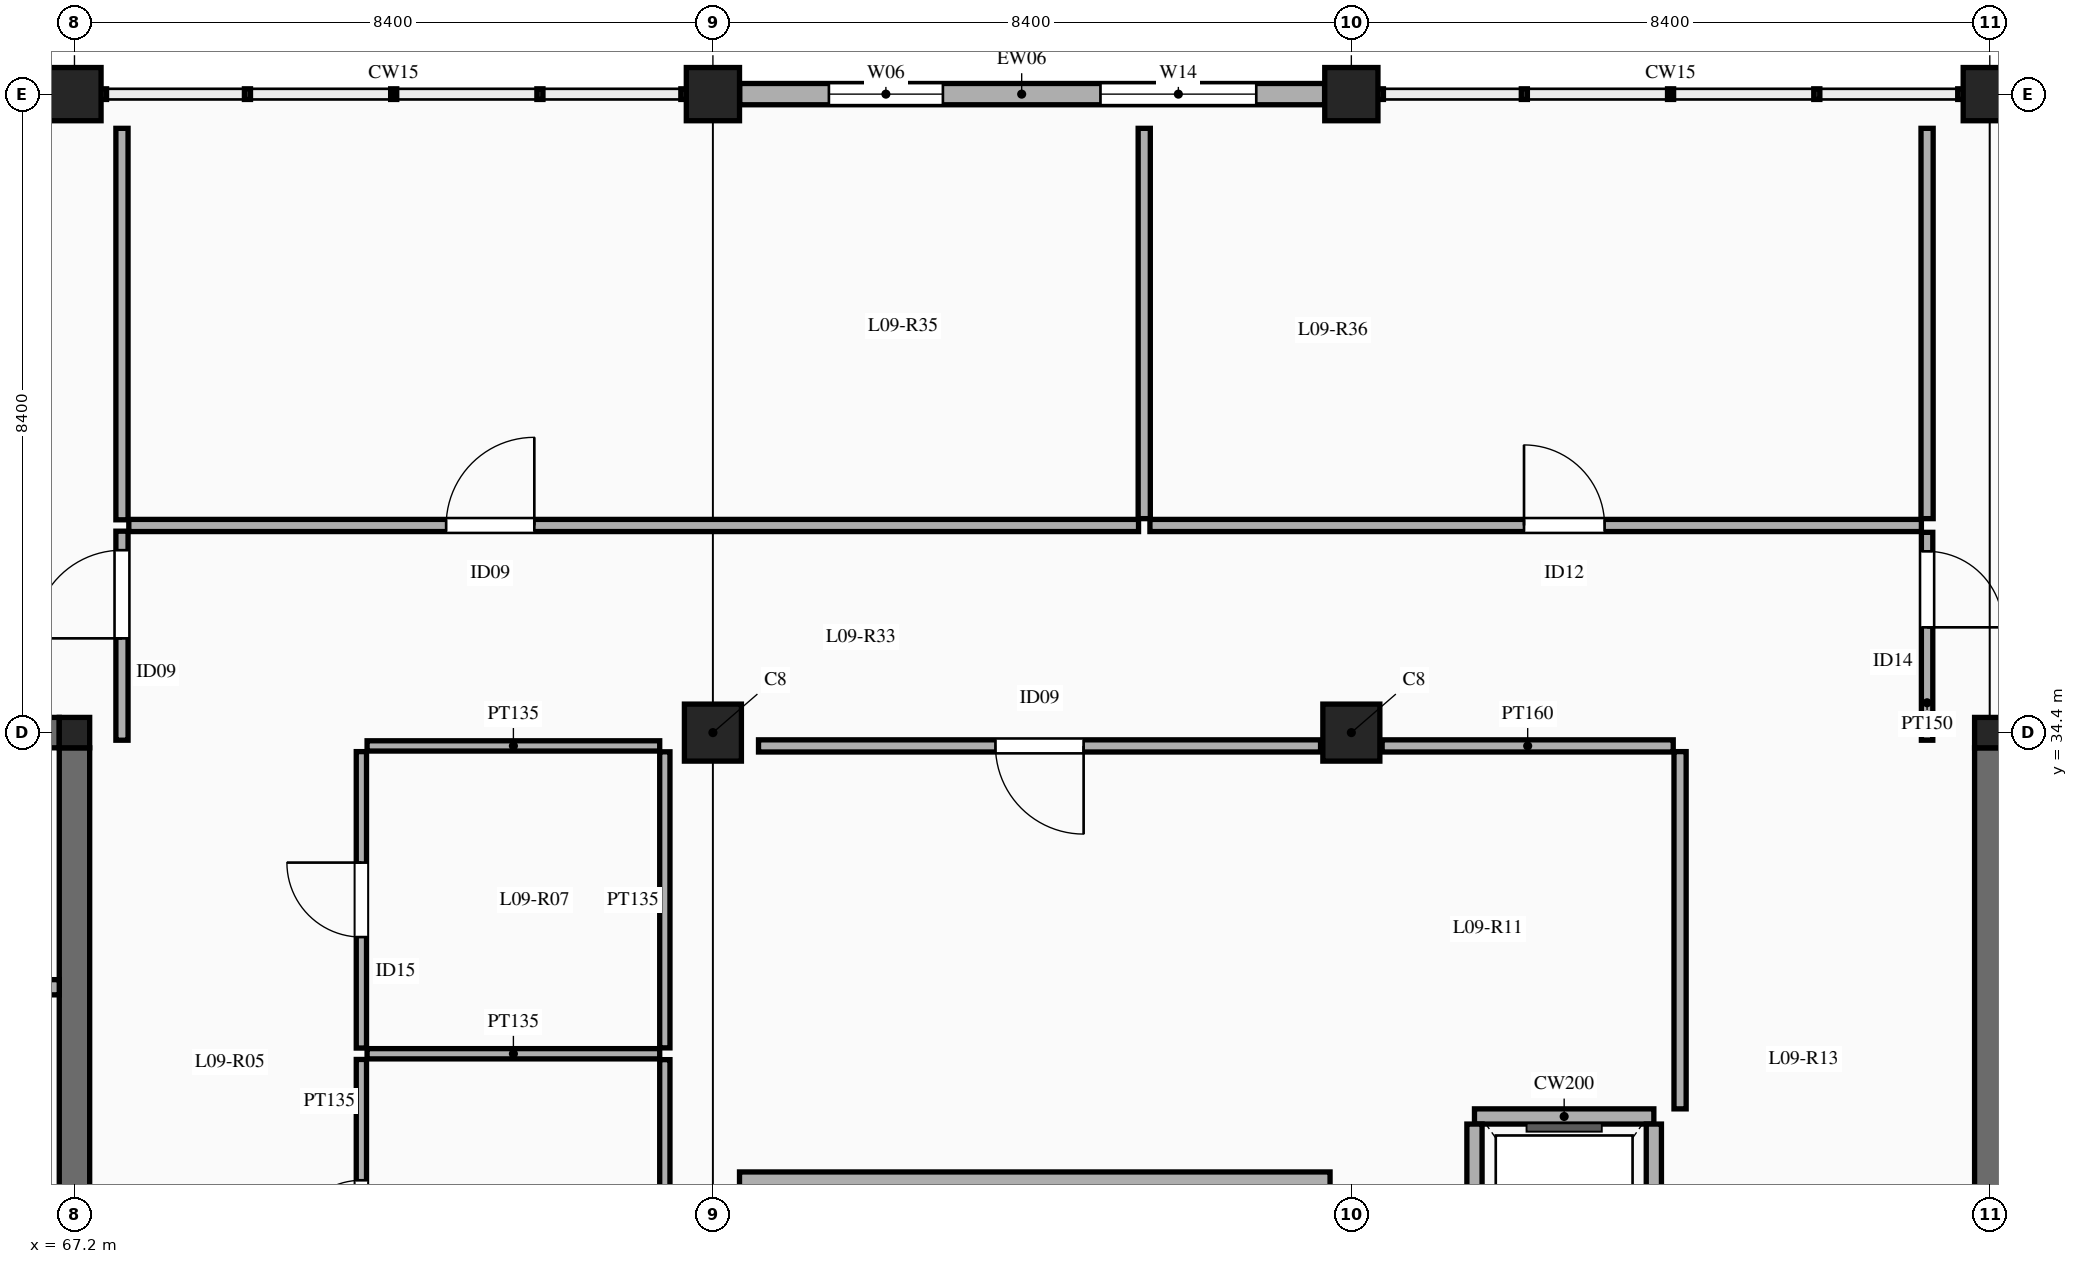
"""IFC4 building model, lengths in metres.
Left out: names, types, materials, properties, quantities, classifications, styles, units other than length and angle.
Written with IfcOpenShell. Run it as: python <this file> out.ifc"""

import sys

from ifc_helpers import new_model, si_unit, direction, frame, frame_2d, origin, origin_2d, place, context, subcontext, project, spatial, rectangle, extrude, element, fill, save


model = new_model("IFC4")
c1 = context("Model", 3, precision=1e-05, world=origin(), true_north=direction((0.0, 1.0)))
c2 = subcontext(c1, "Body", "Model", "MODEL_VIEW")
j1 = project(units=[si_unit("LENGTHUNIT", "METRE"), si_unit("PLANEANGLEUNIT", "RADIAN")], contexts=[c1])
p1 = place(None, origin())
s1 = spatial("IfcSite", under=j1, at=p1, CompositionType="ELEMENT")
p2 = place(p1, origin())
s2 = spatial("IfcBuilding", under=s1, at=p2, CompositionType="ELEMENT")
p3 = place(p2, frame((0.0, 0.0, 42.0)))
s3 = spatial("IfcBuildingStorey", under=s2, at=p3, CompositionType="ELEMENT", Elevation=42.0)
p4 = place(p3, frame((67.2, 34.4, 0.0), z_axis=(0.0, 0.0, 1.0), x_axis=(1.0, 0.0, 0.0)))
e1 = element("IfcColumn", 1, at=p4, inside=s3, PredefinedType="COLUMN", context=c2, shape_type="SweptSolid", body=[
    extrude(rectangle(XDim=0.4, YDim=0.4, at=origin_2d()), origin(), (0.0, 0.0, 1.0), 4.5),
])
p5 = place(p3, frame((67.2, 42.8, 0.0), z_axis=(0.0, 0.0, 1.0), x_axis=(1.0, 0.0, 0.0)))
e2 = element("IfcColumn", 2, at=p5, inside=s3, PredefinedType="COLUMN", context=c2, shape_type="SweptSolid", body=[
    extrude(rectangle(XDim=0.7, YDim=0.7, at=origin_2d()), origin(), (0.0, 0.0, 1.0), 4.5),
])
p6 = place(p3, frame((75.6, 34.4, 0.0), z_axis=(0.0, 0.0, 1.0), x_axis=(1.0, 0.0, 0.0)))
e3 = element("IfcColumn", 3, at=p6, inside=s3, PredefinedType="COLUMN", context=c2, shape_type="SweptSolid", body=[
    extrude(rectangle(XDim=0.75, YDim=0.75, at=origin_2d()), origin(), (0.0, 0.0, 1.0), 4.5),
])
p7 = place(p3, frame((75.6, 42.8, 0.0), z_axis=(0.0, 0.0, 1.0), x_axis=(1.0, 0.0, 0.0)))
e4 = element("IfcColumn", 4, at=p7, inside=s3, PredefinedType="COLUMN", context=c2, shape_type="SweptSolid", body=[
    extrude(rectangle(XDim=0.7, YDim=0.7, at=origin_2d()), origin(), (0.0, 0.0, 1.0), 4.5),
])
p8 = place(p3, frame((84.0, 34.4, 0.0), z_axis=(0.0, 0.0, 1.0), x_axis=(1.0, 0.0, 0.0)))
e5 = element("IfcColumn", 5, at=p8, inside=s3, PredefinedType="COLUMN", context=c2, shape_type="SweptSolid", body=[
    extrude(rectangle(XDim=0.75, YDim=0.75, at=origin_2d()), origin(), (0.0, 0.0, 1.0), 4.5),
])
p9 = place(p3, frame((84.0, 42.8, 0.0), z_axis=(0.0, 0.0, 1.0), x_axis=(1.0, 0.0, 0.0)))
e6 = element("IfcColumn", 6, at=p9, inside=s3, PredefinedType="COLUMN", context=c2, shape_type="SweptSolid", body=[
    extrude(rectangle(XDim=0.7, YDim=0.7, at=origin_2d()), origin(), (0.0, 0.0, 1.0), 4.5),
])
p10 = place(p3, frame((92.4, 34.4, 0.0), z_axis=(0.0, 0.0, 1.0), x_axis=(1.0, 0.0, 0.0)))
e7 = element("IfcColumn", 7, at=p10, inside=s3, PredefinedType="COLUMN", context=c2, shape_type="SweptSolid", body=[
    extrude(rectangle(XDim=0.4, YDim=0.4, at=origin_2d()), origin(), (0.0, 0.0, 1.0), 4.5),
])
p11 = place(p3, frame((92.4, 42.8, 0.0), z_axis=(0.0, 0.0, 1.0), x_axis=(1.0, 0.0, 0.0)))
e8 = element("IfcColumn", 8, at=p11, inside=s3, PredefinedType="COLUMN", context=c2, shape_type="SweptSolid", body=[
    extrude(rectangle(XDim=0.7, YDim=0.7, at=origin_2d()), origin(), (0.0, 0.0, 1.0), 4.5),
])
for number, where, z_axis, x_axis in (
    (9, (67.2, 26.2, 0.0), (0.0, 0.0, 1.0), (0.0, 1.0, 0.0)),
    (10, (59.0, 34.4, 0.0), (0.0, 0.0, 1.0), (1.0, 0.0, 0.0)),
    (11, (92.4, 26.2, 0.0), (0.0, 0.0, 1.0), (0.0, 1.0, 0.0)),
):
    element("IfcWall", number, at=place(p3, frame(where, z_axis=z_axis, x_axis=x_axis)), inside=s3, PredefinedType="SHEAR", context=c2, shape_type="SweptSolid", body=[
        extrude(rectangle(XDim=8.0, YDim=0.4, at=frame_2d((4.0, 0.0))), origin(), (0.0, 0.0, 1.0), 4.5),
    ])
p12 = place(p3, frame((75.952, 42.8, 0.0), z_axis=(0.0, 0.0, 1.0), x_axis=(1.0, 0.0, 0.0)))
e12 = element("IfcWall", 12, at=p12, inside=s3, PredefinedType="ELEMENTEDWALL", context=c2, shape_type="SweptSolid", body=[
    extrude(rectangle(XDim=7.696, YDim=0.28, at=frame_2d((3.848, 0.0))), origin(), (0.0, 0.0, 1.0), 3.55),
])
p13 = place(p12, frame((1.174, 0.0, 0.9)))
e13 = element("IfcOpeningElement", 13, at=p13, cuts=e12, PredefinedType="OPENING", context=c2, shape_type="SweptSolid", body=[
    extrude(rectangle(XDim=1.5, YDim=2.0, at=frame_2d((0.75, 1.0))), frame((0.0, 0.15, 0.0), z_axis=(0.0, -1.0, 0.0), x_axis=(1.0, 0.0, 0.0)), (0.0, 0.0, 1.0), 0.3),
])
p14 = place(p12, frame((4.747, 0.0, 0.9)))
e14 = element("IfcOpeningElement", 14, at=p14, cuts=e12, PredefinedType="OPENING", context=c2, shape_type="SweptSolid", body=[
    extrude(rectangle(XDim=2.05, YDim=2.1, at=frame_2d((1.025, 1.05))), frame((0.0, 0.15, 0.0), z_axis=(0.0, -1.0, 0.0), x_axis=(1.0, 0.0, 0.0)), (0.0, 0.0, 1.0), 0.3),
])
p15 = place(p3, frame((63.05, 31.05, 0.0), z_axis=(0.0, 0.0, 1.0), x_axis=(1.0, 0.0, 0.0)))
e15 = element("IfcWall", 15, at=p15, inside=s3, PredefinedType="SOLIDWALL", context=c2, shape_type="SweptSolid", body=[
    extrude(rectangle(XDim=3.95, YDim=0.2, at=frame_2d((1.975, 0.0))), origin(), (0.0, 0.0, 1.0), 4.3),
])
p16 = place(p15, frame((1.4, 0.0, 0.0)))
e16 = element("IfcOpeningElement", 16, at=p16, cuts=e15, PredefinedType="OPENING", context=c2, shape_type="SweptSolid", body=[
    extrude(rectangle(XDim=1.1, YDim=2.15, at=frame_2d((0.55, 1.075))), frame((0.0, 0.11, 0.0), z_axis=(0.0, -1.0, 0.0), x_axis=(1.0, 0.0, 0.0)), (0.0, 0.0, 1.0), 0.22),
])
p17 = place(p3, frame((75.95, 28.52, 0.0), z_axis=(0.0, 0.0, 1.0), x_axis=(1.0, 0.0, 0.0)))
e17 = element("IfcWall", 17, at=p17, inside=s3, PredefinedType="SOLIDWALL", context=c2, shape_type="SweptSolid", body=[
    extrude(rectangle(XDim=7.77, YDim=0.2, at=frame_2d((3.885, 0.0))), origin(), (0.0, 0.0, 1.0), 4.3),
])
p18 = place(p3, frame((85.62, 29.35, 0.0), z_axis=(0.0, 0.0, 1.0), x_axis=(1.0, 0.0, 0.0)))
e18 = element("IfcWall", 18, at=p18, inside=s3, PredefinedType="SOLIDWALL", context=c2, shape_type="SweptSolid", body=[
    extrude(rectangle(XDim=2.36, YDim=0.2, at=frame_2d((1.18, 0.0))), origin(), (0.0, 0.0, 1.0), 4.3),
])
p19 = place(p3, frame((85.62, 26.35, 0.0), z_axis=(0.0, 0.0, 1.0), x_axis=(0.0, 1.0, 0.0)))
e19 = element("IfcWall", 19, at=p19, inside=s3, PredefinedType="SOLIDWALL", context=c2, shape_type="SweptSolid", body=[
    extrude(rectangle(XDim=2.9, YDim=0.2, at=frame_2d((1.45, 0.0))), origin(), (0.0, 0.0, 1.0), 4.3),
])
p20 = place(p3, frame((87.98, 26.35, 0.0), z_axis=(0.0, 0.0, 1.0), x_axis=(0.0, 1.0, 0.0)))
e20 = element("IfcWall", 20, at=p20, inside=s3, PredefinedType="SOLIDWALL", context=c2, shape_type="SweptSolid", body=[
    extrude(rectangle(XDim=2.9, YDim=0.2, at=frame_2d((1.45, 0.0))), origin(), (0.0, 0.0, 1.0), 4.03),
])
p21 = place(p3, frame((70.975, 26.15, 0.0), z_axis=(0.0, 0.0, 1.0), x_axis=(0.0, 1.0, 0.0)))
e21 = element("IfcWall", 21, at=p21, inside=s3, PredefinedType="PARTITIONING", context=c2, shape_type="SweptSolid", body=[
    extrude(rectangle(XDim=3.95, YDim=0.135, at=frame_2d((1.975, 0.0))), origin(), (0.0, 0.0, 1.0), 3.45),
])
p22 = place(p21, frame((1.441, 0.0, 0.0)))
e22 = element("IfcOpeningElement", 22, at=p22, cuts=e21, PredefinedType="OPENING", context=c2, shape_type="SweptSolid", body=[
    extrude(rectangle(XDim=0.92, YDim=2.12, at=frame_2d((0.46, 1.06))), frame((0.0, 0.077, 0.0), z_axis=(0.0, -1.0, 0.0), x_axis=(1.0, 0.0, 0.0)), (0.0, 0.0, 1.0), 0.155),
])
p23 = place(p3, frame((70.975, 30.25, 0.0), z_axis=(0.0, 0.0, 1.0), x_axis=(0.0, 1.0, 0.0)))
e23 = element("IfcWall", 23, at=p23, inside=s3, PredefinedType="PARTITIONING", context=c2, shape_type="SweptSolid", body=[
    extrude(rectangle(XDim=3.9, YDim=0.135, at=frame_2d((1.95, 0.0))), origin(), (0.0, 0.0, 1.0), 3.45),
])
p24 = place(p23, frame((1.46, 0.0, 0.0)))
e24 = element("IfcOpeningElement", 24, at=p24, cuts=e23, PredefinedType="OPENING", context=c2, shape_type="SweptSolid", body=[
    extrude(rectangle(XDim=0.98, YDim=2.15, at=frame_2d((0.49, 1.075))), frame((0.0, 0.077, 0.0), z_axis=(0.0, -1.0, 0.0), x_axis=(1.0, 0.0, 0.0)), (0.0, 0.0, 1.0), 0.155),
])
for number, where, z_axis, x_axis in (
    (25, (71.05, 30.175, 0.0), (0.0, 0.0, 1.0), (1.0, 0.0, 0.0)),
    (26, (71.05, 34.225, 0.0), (0.0, 0.0, 1.0), (1.0, 0.0, 0.0)),
):
    element("IfcWall", number, at=place(p3, frame(where, z_axis=z_axis, x_axis=x_axis)), inside=s3, PredefinedType="PARTITIONING", context=c2, shape_type="SweptSolid", body=[
        extrude(rectangle(XDim=3.85, YDim=0.135, at=frame_2d((1.925, 0.0))), origin(), (0.0, 0.0, 1.0), 3.45),
    ])
p25 = place(p3, frame((88.325, 29.45, 0.0), z_axis=(0.0, 0.0, 1.0), x_axis=(0.0, 1.0, 0.0)))
e27 = element("IfcWall", 27, at=p25, inside=s3, PredefinedType="PARTITIONING", context=c2, shape_type="SweptSolid", body=[
    extrude(rectangle(XDim=4.7, YDim=0.16, at=frame_2d((2.35, 0.0))), origin(), (0.0, 0.0, 1.0), 3.45),
])
p26 = place(p3, frame((76.2, 34.225, 0.0), z_axis=(0.0, 0.0, 1.0), x_axis=(1.0, 0.0, 0.0)))
e28 = element("IfcWall", 28, at=p26, inside=s3, PredefinedType="PARTITIONING", context=c2, shape_type="SweptSolid", body=[
    extrude(rectangle(XDim=7.395, YDim=0.16, at=frame_2d((3.698, 0.0))), origin(), (0.0, 0.0, 1.0), 3.45),
])
p27 = place(p26, frame((3.117, 0.0, 0.0)))
e29 = element("IfcOpeningElement", 29, at=p27, cuts=e28, PredefinedType="OPENING", context=c2, shape_type="SweptSolid", body=[
    extrude(rectangle(XDim=1.16, YDim=2.2, at=frame_2d((0.58, 1.1))), frame((0.0, 0.09, 0.0), z_axis=(0.0, -1.0, 0.0), x_axis=(1.0, 0.0, 0.0)), (0.0, 0.0, 1.0), 0.18),
])
p28 = place(p3, frame((84.405, 34.225, 0.0), z_axis=(0.0, 0.0, 1.0), x_axis=(1.0, 0.0, 0.0)))
e30 = element("IfcWall", 30, at=p28, inside=s3, PredefinedType="PARTITIONING", context=c2, shape_type="SweptSolid", body=[
    extrude(rectangle(XDim=3.83, YDim=0.16, at=frame_2d((1.915, 0.0))), origin(), (0.0, 0.0, 1.0), 3.45),
])
p29 = place(p3, frame((67.825, 34.3, 0.0), z_axis=(0.0, 0.0, 1.0), x_axis=(0.0, 1.0, 0.0)))
e31 = element("IfcWall", 31, at=p29, inside=s3, PredefinedType="PARTITIONING", context=c2, shape_type="SweptSolid", body=[
    extrude(rectangle(XDim=2.75, YDim=0.16, at=frame_2d((1.375, 0.0))), origin(), (0.0, 0.0, 1.0), 3.45),
])
p30 = place(p29, frame((1.34, 0.0, 0.0)))
e32 = element("IfcOpeningElement", 32, at=p30, cuts=e31, PredefinedType="OPENING", context=c2, shape_type="SweptSolid", body=[
    extrude(rectangle(XDim=1.16, YDim=2.2, at=frame_2d((0.58, 1.1))), frame((0.0, 0.09, 0.0), z_axis=(0.0, -1.0, 0.0), x_axis=(1.0, 0.0, 0.0)), (0.0, 0.0, 1.0), 0.18),
])
p31 = place(p3, frame((67.915, 37.125, 0.0), z_axis=(0.0, 0.0, 1.0), x_axis=(1.0, 0.0, 0.0)))
e33 = element("IfcWall", 33, at=p31, inside=s3, PredefinedType="PARTITIONING", context=c2, shape_type="SweptSolid", body=[
    extrude(rectangle(XDim=13.285, YDim=0.16, at=frame_2d((6.643, 0.0))), origin(), (0.0, 0.0, 1.0), 3.45),
])
p32 = place(p31, frame((4.175, 0.0, 0.0)))
e34 = element("IfcOpeningElement", 34, at=p32, cuts=e33, PredefinedType="OPENING", context=c2, shape_type="SweptSolid", body=[
    extrude(rectangle(XDim=1.16, YDim=2.2, at=frame_2d((0.58, 1.1))), frame((0.0, 0.09, 0.0), z_axis=(0.0, -1.0, 0.0), x_axis=(1.0, 0.0, 0.0)), (0.0, 0.0, 1.0), 0.18),
])
p33 = place(p3, frame((81.35, 37.125, 0.0), z_axis=(0.0, 0.0, 1.0), x_axis=(1.0, 0.0, 0.0)))
e35 = element("IfcWall", 35, at=p33, inside=s3, PredefinedType="PARTITIONING", context=c2, shape_type="SweptSolid", body=[
    extrude(rectangle(XDim=10.15, YDim=0.16, at=frame_2d((5.075, 0.0))), origin(), (0.0, 0.0, 1.0), 3.45),
])
p34 = place(p33, frame((4.922, 0.0, 0.0)))
e36 = element("IfcOpeningElement", 36, at=p34, cuts=e35, PredefinedType="OPENING", context=c2, shape_type="SweptSolid", body=[
    extrude(rectangle(XDim=1.06, YDim=2.18, at=frame_2d((0.53, 1.09))), frame((0.0, 0.09, 0.0), z_axis=(0.0, -1.0, 0.0), x_axis=(1.0, 0.0, 0.0)), (0.0, 0.0, 1.0), 0.18),
])
p35 = place(p3, frame((91.575, 34.3, 0.0), z_axis=(0.0, 0.0, 1.0), x_axis=(0.0, 1.0, 0.0)))
e37 = element("IfcWall", 37, at=p35, inside=s3, PredefinedType="PARTITIONING", context=c2, shape_type="SweptSolid", body=[
    extrude(rectangle(XDim=2.735, YDim=0.15, at=frame_2d((1.367, 0.0))), origin(), (0.0, 0.0, 1.0), 3.45),
])
p36 = place(p35, frame((1.485, 0.0, 0.0)))
e38 = element("IfcOpeningElement", 38, at=p36, cuts=e37, PredefinedType="OPENING", context=c2, shape_type="SweptSolid", body=[
    extrude(rectangle(XDim=1.0, YDim=2.15, at=frame_2d((0.5, 1.075))), frame((0.0, 0.085, 0.0), z_axis=(0.0, -1.0, 0.0), x_axis=(1.0, 0.0, 0.0)), (0.0, 0.0, 1.0), 0.17),
])
p37 = place(p3, frame((67.825, 37.2, 0.0), z_axis=(0.0, 0.0, 1.0), x_axis=(0.0, 1.0, 0.0)))
e39 = element("IfcWall", 39, at=p37, inside=s3, PredefinedType="PARTITIONING", context=c2, shape_type="SweptSolid", body=[
    extrude(rectangle(XDim=5.15, YDim=0.16, at=frame_2d((2.575, 0.0))), origin(), (0.0, 0.0, 1.0), 3.45),
])
for number, where, z_axis, x_axis in (
    (40, (81.275, 37.215, 0.0), (0.0, 0.0, 1.0), (0.0, 1.0, 0.0)),
    (41, (91.575, 37.215, 0.0), (0.0, 0.0, 1.0), (0.0, 1.0, 0.0)),
):
    element("IfcWall", number, at=place(p3, frame(where, z_axis=z_axis, x_axis=x_axis)), inside=s3, PredefinedType="PARTITIONING", context=c2, shape_type="SweptSolid", body=[
        extrude(rectangle(XDim=5.135, YDim=0.16, at=frame_2d((2.567, 0.0))), origin(), (0.0, 0.0, 1.0), 3.45),
    ])
p38 = place(p3, frame((74.968, 26.15, 0.0), z_axis=(0.0, 0.0, 1.0), x_axis=(0.0, 1.0, 0.0)))
e42 = element("IfcWall", 42, at=p38, inside=s3, PredefinedType="PARTITIONING", context=c2, shape_type="SweptSolid", body=[
    extrude(rectangle(XDim=3.948, YDim=0.135, at=frame_2d((1.974, 0.0))), origin(), (0.0, 0.0, 1.0), 3.45),
])
p39 = place(p3, frame((74.968, 30.252, 0.0), z_axis=(0.0, 0.0, 1.0), x_axis=(0.0, 1.0, 0.0)))
e43 = element("IfcWall", 43, at=p39, inside=s3, PredefinedType="PARTITIONING", context=c2, shape_type="SweptSolid", body=[
    extrude(rectangle(XDim=3.895, YDim=0.135, at=frame_2d((1.948, 0.0))), origin(), (0.0, 0.0, 1.0), 3.45),
])
p40 = place(p13, origin())
e44 = element("IfcWindow", 44, at=p40, inside=s3, PartitioningType="DOUBLE_PANEL_VERTICAL", PredefinedType="WINDOW", context=c2, shape_type="SweptSolid", body=[
    extrude(rectangle(XDim=1.5, YDim=2.0, at=frame_2d((0.75, 1.0))), frame((0.0, 0.03, 0.0), z_axis=(0.0, -1.0, 0.0), x_axis=(1.0, 0.0, 0.0)), (0.0, 0.0, 1.0), 0.06),
])
fill(e13, e44)
p41 = place(p14, origin())
e45 = element("IfcWindow", 45, at=p41, inside=s3, PartitioningType="TRIPLE_PANEL_VERTICAL", PredefinedType="WINDOW", context=c2, shape_type="SweptSolid", body=[
    extrude(rectangle(XDim=2.05, YDim=2.1, at=frame_2d((1.025, 1.05))), frame((0.0, 0.03, 0.0), z_axis=(0.0, -1.0, 0.0), x_axis=(1.0, 0.0, 0.0)), (0.0, 0.0, 1.0), 0.06),
])
fill(e14, e45)
p42 = place(p22, origin())
e46 = element("IfcDoor", 46, at=p42, inside=s3, OperationType="SINGLE_SWING_LEFT", PredefinedType="DOOR", context=c2, shape_type="SweptSolid", body=[
    extrude(rectangle(XDim=0.92, YDim=2.12, at=frame_2d((0.46, 1.06))), frame((0.0, 0.025, 0.0), z_axis=(0.0, -1.0, 0.0), x_axis=(1.0, 0.0, 0.0)), (0.0, 0.0, 1.0), 0.05),
])
fill(e22, e46)
p43 = place(p24, origin())
e47 = element("IfcDoor", 47, at=p43, inside=s3, OperationType="SINGLE_SWING_RIGHT", PredefinedType="DOOR", context=c2, shape_type="SweptSolid", body=[
    extrude(rectangle(XDim=0.98, YDim=2.15, at=frame_2d((0.49, 1.075))), frame((0.0, 0.025, 0.0), z_axis=(0.0, -1.0, 0.0), x_axis=(1.0, 0.0, 0.0)), (0.0, 0.0, 1.0), 0.05),
])
fill(e24, e47)
p44 = place(p27, frame((1.16, 0.0, 0.0), z_axis=(0.0, 0.0, 1.0), x_axis=(-1.0, 0.0, 0.0)))
e48 = element("IfcDoor", 48, at=p44, inside=s3, OperationType="SINGLE_SWING_LEFT", PredefinedType="DOOR", context=c2, shape_type="SweptSolid", body=[
    extrude(rectangle(XDim=1.16, YDim=2.2, at=frame_2d((0.58, 1.1))), frame((0.0, 0.025, 0.0), z_axis=(0.0, -1.0, 0.0), x_axis=(1.0, 0.0, 0.0)), (0.0, 0.0, 1.0), 0.05),
])
fill(e29, e48)
p45 = place(p30, origin())
e49 = element("IfcDoor", 49, at=p45, inside=s3, OperationType="SINGLE_SWING_LEFT", PredefinedType="DOOR", context=c2, shape_type="SweptSolid", body=[
    extrude(rectangle(XDim=1.16, YDim=2.2, at=frame_2d((0.58, 1.1))), frame((0.0, 0.025, 0.0), z_axis=(0.0, -1.0, 0.0), x_axis=(1.0, 0.0, 0.0)), (0.0, 0.0, 1.0), 0.05),
])
fill(e32, e49)
p46 = place(p32, origin())
e50 = element("IfcDoor", 50, at=p46, inside=s3, OperationType="SINGLE_SWING_RIGHT", PredefinedType="DOOR", context=c2, shape_type="SweptSolid", body=[
    extrude(rectangle(XDim=1.16, YDim=2.2, at=frame_2d((0.58, 1.1))), frame((0.0, 0.025, 0.0), z_axis=(0.0, -1.0, 0.0), x_axis=(1.0, 0.0, 0.0)), (0.0, 0.0, 1.0), 0.05),
])
fill(e34, e50)
p47 = place(p34, origin())
e51 = element("IfcDoor", 51, at=p47, inside=s3, OperationType="SINGLE_SWING_LEFT", PredefinedType="DOOR", context=c2, shape_type="SweptSolid", body=[
    extrude(rectangle(XDim=1.06, YDim=2.18, at=frame_2d((0.53, 1.09))), frame((0.0, 0.025, 0.0), z_axis=(0.0, -1.0, 0.0), x_axis=(1.0, 0.0, 0.0)), (0.0, 0.0, 1.0), 0.05),
])
fill(e36, e51)
p48 = place(p36, frame((1.0, 0.0, 0.0), z_axis=(0.0, 0.0, 1.0), x_axis=(-1.0, 0.0, 0.0)))
e52 = element("IfcDoor", 52, at=p48, inside=s3, OperationType="SINGLE_SWING_RIGHT", PredefinedType="DOOR", context=c2, shape_type="SweptSolid", body=[
    extrude(rectangle(XDim=1.0, YDim=2.15, at=frame_2d((0.5, 1.075))), frame((0.0, 0.025, 0.0), z_axis=(0.0, -1.0, 0.0), x_axis=(1.0, 0.0, 0.0)), (0.0, 0.0, 1.0), 0.05),
])
fill(e38, e52)
save(model, sys.argv[1])
